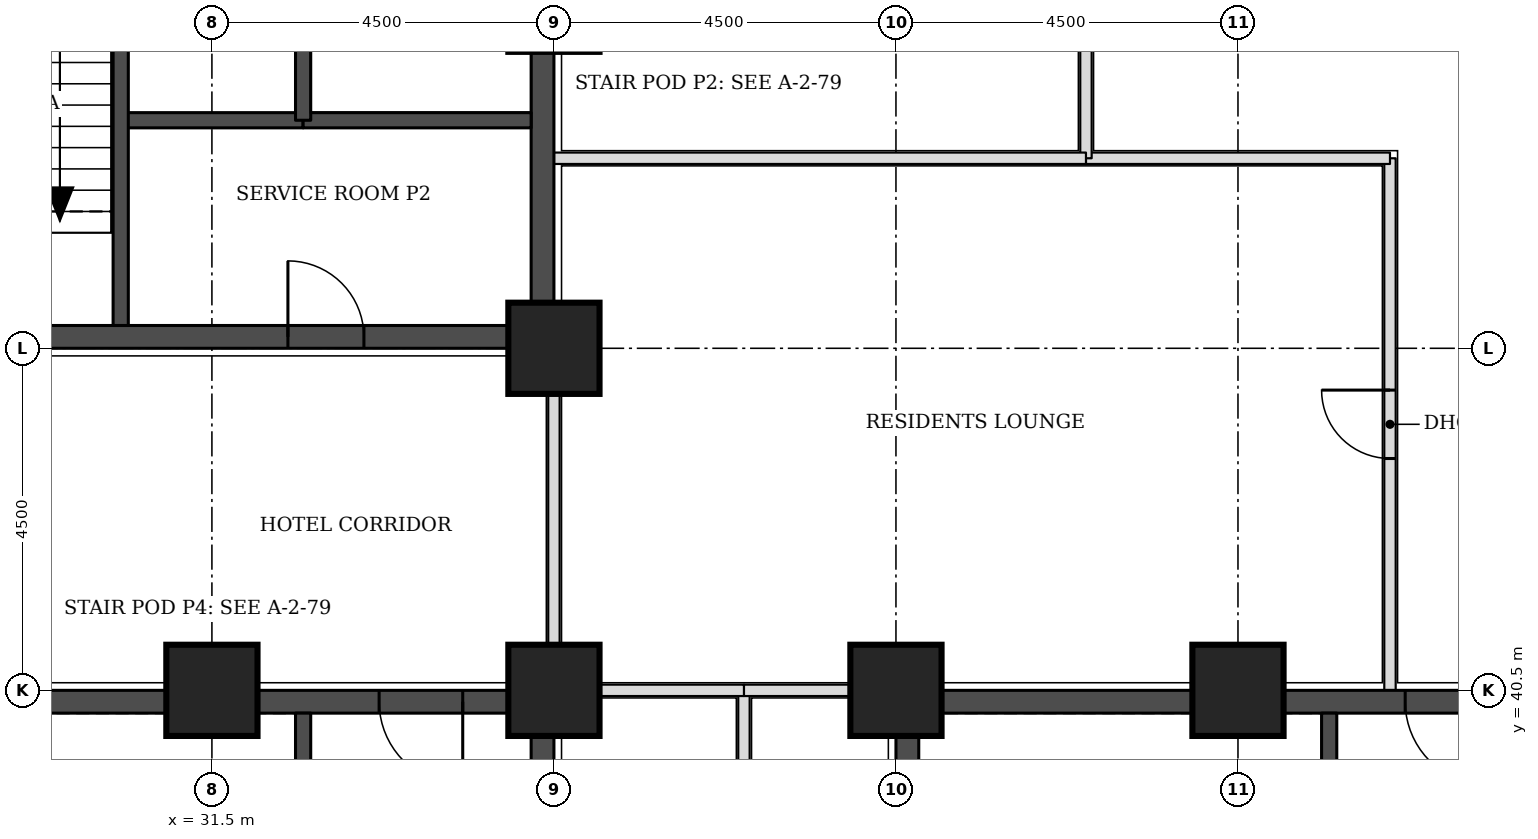
"""IFC4 building model, lengths in metres.
Left out: names, types, materials, properties, quantities, classifications, styles, units other than length and angle.
Written with IfcOpenShell. Run it as: python <this file> out.ifc"""

import sys

from ifc_helpers import new_model, si_unit, direction, frame, frame_2d, origin, origin_2d, place, context, subcontext, project, spatial, rectangle, extrude, element, fill, save


model = new_model("IFC4")
c1 = context("Model", 3, precision=1e-05, world=origin(), true_north=direction((0.0, 1.0)))
c2 = subcontext(c1, "Body", "Model", "MODEL_VIEW")
j1 = project(units=[si_unit("LENGTHUNIT", "METRE"), si_unit("PLANEANGLEUNIT", "RADIAN")], contexts=[c1])
p1 = place(None, origin())
s1 = spatial("IfcSite", under=j1, at=p1, CompositionType="ELEMENT")
p2 = place(p1, origin())
s2 = spatial("IfcBuilding", under=s1, at=p2, CompositionType="ELEMENT")
p3 = place(p2, frame((0.0, 0.0, 46.2)))
s3 = spatial("IfcBuildingStorey", under=s2, at=p3, CompositionType="ELEMENT", Elevation=46.2)
for number, where, z_axis, x_axis in (
    (1, (31.5, 40.5, 0.0), (0.0, 0.0, 1.0), (1.0, 0.0, 0.0)),
    (2, (36.0, 40.5, 0.0), (0.0, 0.0, 1.0), (1.0, 0.0, 0.0)),
    (3, (40.5, 40.5, 0.0), (0.0, 0.0, 1.0), (1.0, 0.0, 0.0)),
    (4, (45.0, 40.5, 0.0), (0.0, 0.0, 1.0), (1.0, 0.0, 0.0)),
    (5, (36.0, 45.0, 0.0), (0.0, 0.0, 1.0), (1.0, 0.0, 0.0)),
):
    element("IfcColumn", number, at=place(p3, frame(where, z_axis=z_axis, x_axis=x_axis)), inside=s3, PredefinedType="COLUMN", context=c2, shape_type="SweptSolid", body=[
        extrude(rectangle(XDim=1.2, YDim=1.2, at=origin_2d()), origin(), (0.0, 0.0, 1.0), 3.3),
    ])
p4 = place(p3, frame((27.3, 45.15, 0.0), z_axis=(0.0, 0.0, 1.0), x_axis=(1.0, 0.0, 0.0)))
e6 = element("IfcWall", 6, at=p4, inside=s3, PredefinedType="SHEAR", context=c2, shape_type="SweptSolid", body=[
    extrude(rectangle(XDim=8.4, YDim=0.3, at=frame_2d((4.2, 0.0))), origin(), (0.0, 0.0, 1.0), 3.3),
])
p5 = place(p4, frame((5.2, 0.0, 0.0)))
e7 = element("IfcOpeningElement", 7, at=p5, cuts=e6, PredefinedType="OPENING", context=c2, shape_type="SweptSolid", body=[
    extrude(rectangle(XDim=1.0, YDim=2.1, at=frame_2d((0.5, 1.05))), frame((0.0, 0.16, 0.0), z_axis=(0.0, -1.0, 0.0), x_axis=(1.0, 0.0, 0.0)), (0.0, 0.0, 1.0), 0.32),
])
p6 = place(p3, frame((35.85, 45.0, 0.0), z_axis=(0.0, 0.0, 1.0), x_axis=(0.0, 1.0, 0.0)))
e8 = element("IfcWall", 8, at=p6, inside=s3, PredefinedType="SHEAR", context=c2, shape_type="SweptSolid", body=[
    extrude(rectangle(XDim=9.0, YDim=0.3, at=frame_2d((4.5, 0.0))), origin(), (0.0, 0.0, 1.0), 3.3),
])
p7 = place(p3, frame((40.8, 40.35, 0.0), z_axis=(0.0, 0.0, 1.0), x_axis=(1.0, 0.0, 0.0)))
e9 = element("IfcWall", 9, at=p7, inside=s3, PredefinedType="SHEAR", context=c2, shape_type="SweptSolid", body=[
    extrude(rectangle(XDim=8.4, YDim=0.3, at=frame_2d((4.2, 0.0))), origin(), (0.0, 0.0, 1.0), 3.3),
])
p8 = place(p7, frame((6.4, 0.0, 0.0)))
e10 = element("IfcOpeningElement", 10, at=p8, cuts=e9, PredefinedType="OPENING", context=c2, shape_type="SweptSolid", body=[
    extrude(rectangle(XDim=1.1, YDim=2.1, at=frame_2d((0.55, 1.05))), frame((0.0, 0.16, 0.0), z_axis=(0.0, -1.0, 0.0), x_axis=(1.0, 0.0, 0.0)), (0.0, 0.0, 1.0), 0.32),
])
p9 = place(p3, frame((40.65, 31.5, 0.0), z_axis=(0.0, 0.0, 1.0), x_axis=(0.0, 1.0, 0.0)))
e11 = element("IfcWall", 11, at=p9, inside=s3, PredefinedType="SHEAR", context=c2, shape_type="SweptSolid", body=[
    extrude(rectangle(XDim=9.0, YDim=0.3, at=frame_2d((4.5, 0.0))), origin(), (0.0, 0.0, 1.0), 3.3),
])
p10 = place(p9, frame((0.4, 0.0, 0.0)))
e12 = element("IfcOpeningElement", 12, at=p10, cuts=e11, PredefinedType="OPENING", context=c2, shape_type="SweptSolid", body=[
    extrude(rectangle(XDim=1.1, YDim=2.1, at=frame_2d((0.55, 1.05))), frame((0.0, 0.16, 0.0), z_axis=(0.0, -1.0, 0.0), x_axis=(1.0, 0.0, 0.0)), (0.0, 0.0, 1.0), 0.32),
])
p11 = place(p3, frame((27.3, 40.35, 0.0), z_axis=(0.0, 0.0, 1.0), x_axis=(1.0, 0.0, 0.0)))
e13 = element("IfcWall", 13, at=p11, inside=s3, PredefinedType="SHEAR", context=c2, shape_type="SweptSolid", body=[
    extrude(rectangle(XDim=8.4, YDim=0.3, at=frame_2d((4.2, 0.0))), origin(), (0.0, 0.0, 1.0), 3.3),
])
p12 = place(p11, frame((6.4, 0.0, 0.0)))
e14 = element("IfcOpeningElement", 14, at=p12, cuts=e13, PredefinedType="OPENING", context=c2, shape_type="SweptSolid", body=[
    extrude(rectangle(XDim=1.1, YDim=2.1, at=frame_2d((0.55, 1.05))), frame((0.0, 0.16, 0.0), z_axis=(0.0, -1.0, 0.0), x_axis=(1.0, 0.0, 0.0)), (0.0, 0.0, 1.0), 0.32),
])
p13 = place(p3, frame((35.85, 31.5, 0.0), z_axis=(0.0, 0.0, 1.0), x_axis=(0.0, 1.0, 0.0)))
e15 = element("IfcWall", 15, at=p13, inside=s3, PredefinedType="SHEAR", context=c2, shape_type="SweptSolid", body=[
    extrude(rectangle(XDim=9.0, YDim=0.3, at=frame_2d((4.5, 0.0))), origin(), (0.0, 0.0, 1.0), 3.3),
])
p14 = place(p3, frame((38.5, 27.15, 0.0), z_axis=(0.0, 0.0, 1.0), x_axis=(0.0, 1.0, 0.0)))
e16 = element("IfcWall", 16, at=p14, inside=s3, PredefinedType="PARTITIONING", context=c2, shape_type="SweptSolid", body=[
    extrude(rectangle(XDim=13.35, YDim=0.15, at=frame_2d((6.675, 0.0))), origin(), (0.0, 0.0, 1.0), 3.08),
])
p15 = place(p14, frame((6.225, 0.0, 0.0)))
e17 = element("IfcOpeningElement", 17, at=p15, cuts=e16, PredefinedType="OPENING", context=c2, shape_type="SweptSolid", body=[
    extrude(rectangle(XDim=0.9, YDim=2.1, at=frame_2d((0.45, 1.05))), frame((0.0, 0.085, 0.0), z_axis=(0.0, -1.0, 0.0), x_axis=(1.0, 0.0, 0.0)), (0.0, 0.0, 1.0), 0.17),
])
p16 = place(p3, frame((38.5, 40.5, 0.0), z_axis=(0.0, 0.0, 1.0), x_axis=(1.0, 0.0, 0.0)))
e18 = element("IfcWall", 18, at=p16, inside=s3, PredefinedType="PARTITIONING", context=c2, shape_type="SweptSolid", body=[
    extrude(rectangle(XDim=1.95, YDim=0.15, at=frame_2d((0.975, 0.0))), origin(), (0.0, 0.0, 1.0), 2.33),
])
p17 = place(p3, frame((36.0, 40.55, 0.0), z_axis=(0.0, 0.0, 1.0), x_axis=(0.0, 1.0, 0.0)))
e19 = element("IfcWall", 19, at=p17, inside=s3, PredefinedType="PARTITIONING", context=c2, shape_type="SweptSolid", body=[
    extrude(rectangle(XDim=4.4, YDim=0.15, at=frame_2d((2.2, 0.0))), origin(), (0.0, 0.0, 1.0), 2.33),
])
p18 = place(p3, frame((47.0, 40.5, 0.0), z_axis=(0.0, 0.0, 1.0), x_axis=(0.0, 1.0, 0.0)))
e20 = element("IfcWall", 20, at=p18, inside=s3, PredefinedType="PARTITIONING", context=c2, shape_type="SweptSolid", body=[
    extrude(rectangle(XDim=7.0, YDim=0.15, at=frame_2d((3.5, 0.0))), origin(), (0.0, 0.0, 1.0), 3.08),
])
p19 = place(p18, frame((3.05, 0.0, 0.0)))
e21 = element("IfcOpeningElement", 21, at=p19, cuts=e20, PredefinedType="OPENING", context=c2, shape_type="SweptSolid", body=[
    extrude(rectangle(XDim=0.9, YDim=2.1, at=frame_2d((0.45, 1.05))), frame((0.0, 0.085, 0.0), z_axis=(0.0, -1.0, 0.0), x_axis=(1.0, 0.0, 0.0)), (0.0, 0.0, 1.0), 0.17),
])
p20 = place(p3, frame((43.0, 47.5, 0.0), z_axis=(0.0, 0.0, 1.0), x_axis=(1.0, 0.0, 0.0)))
e22 = element("IfcWall", 22, at=p20, inside=s3, PredefinedType="PARTITIONING", context=c2, shape_type="SweptSolid", body=[
    extrude(rectangle(XDim=4.0, YDim=0.15, at=frame_2d((2.0, 0.0))), origin(), (0.0, 0.0, 1.0), 3.08),
])
p21 = place(p3, frame((43.0, 47.5, 0.0), z_axis=(0.0, 0.0, 1.0), x_axis=(0.0, 1.0, 0.0)))
e23 = element("IfcWall", 23, at=p21, inside=s3, PredefinedType="PARTITIONING", context=c2, shape_type="SweptSolid", body=[
    extrude(rectangle(XDim=6.5, YDim=0.15, at=frame_2d((3.25, 0.0))), origin(), (0.0, 0.0, 1.0), 3.08),
])
p22 = place(p3, frame((36.05, 40.5, 0.0), z_axis=(0.0, 0.0, 1.0), x_axis=(1.0, 0.0, 0.0)))
e24 = element("IfcWall", 24, at=p22, inside=s3, PredefinedType="PARTITIONING", context=c2, shape_type="SweptSolid", body=[
    extrude(rectangle(XDim=2.45, YDim=0.15, at=frame_2d((1.225, 0.0))), origin(), (0.0, 0.0, 1.0), 2.33),
])
p23 = place(p3, frame((36.0, 47.5, 0.0), z_axis=(0.0, 0.0, 1.0), x_axis=(1.0, 0.0, 0.0)))
e25 = element("IfcWall", 25, at=p23, inside=s3, PredefinedType="PARTITIONING", context=c2, shape_type="SweptSolid", body=[
    extrude(rectangle(XDim=7.0, YDim=0.15, at=frame_2d((3.5, 0.0))), origin(), (0.0, 0.0, 1.0), 3.08),
])
p24 = place(p3, frame((30.3, 48.0, 0.0), z_axis=(0.0, 0.0, 1.0), x_axis=(1.0, 0.0, 0.0)))
e26 = element("IfcWall", 26, at=p24, inside=s3, PredefinedType="SOLIDWALL", context=c2, shape_type="SweptSolid", body=[
    extrude(rectangle(XDim=2.4, YDim=0.2, at=frame_2d((1.2, 0.0))), origin(), (0.0, 0.0, 1.0), 3.08),
])
p25 = place(p3, frame((32.7, 48.0, 0.0), z_axis=(0.0, 0.0, 1.0), x_axis=(1.0, 0.0, 0.0)))
e27 = element("IfcWall", 27, at=p25, inside=s3, PredefinedType="SOLIDWALL", context=c2, shape_type="SweptSolid", body=[
    extrude(rectangle(XDim=3.0, YDim=0.2, at=frame_2d((1.5, 0.0))), origin(), (0.0, 0.0, 1.0), 3.08),
])
for number, where, z_axis, x_axis in (
    (28, (30.3, 45.3, 0.0), (0.0, 0.0, 1.0), (0.0, 1.0, 0.0)),
    (29, (32.7, 48.0, 0.0), (0.0, 0.0, 1.0), (0.0, 1.0, 0.0)),
    (30, (46.2, 34.5, 0.0), (0.0, 0.0, 1.0), (0.0, 1.0, 0.0)),
    (31, (32.7, 34.5, 0.0), (0.0, 0.0, 1.0), (0.0, 1.0, 0.0)),
):
    element("IfcWall", number, at=place(p3, frame(where, z_axis=z_axis, x_axis=x_axis)), inside=s3, PredefinedType="SOLIDWALL", context=c2, shape_type="SweptSolid", body=[
        extrude(rectangle(XDim=5.7, YDim=0.2, at=frame_2d((2.85, 0.0))), origin(), (0.0, 0.0, 1.0), 3.08),
    ])
p26 = place(p19, origin())
e32 = element("IfcDoor", 32, at=p26, inside=s3, OperationType="SINGLE_SWING_RIGHT", PredefinedType="DOOR", context=c2, shape_type="SweptSolid", body=[
    extrude(rectangle(XDim=0.9, YDim=2.1, at=frame_2d((0.45, 1.05))), frame((0.0, 0.025, 0.0), z_axis=(0.0, -1.0, 0.0), x_axis=(1.0, 0.0, 0.0)), (0.0, 0.0, 1.0), 0.05),
])
fill(e21, e32)
p27 = place(p5, origin())
e33 = element("IfcDoor", 33, at=p27, inside=s3, OperationType="SINGLE_SWING_LEFT", PredefinedType="DOOR", context=c2, shape_type="SweptSolid", body=[
    extrude(rectangle(XDim=1.0, YDim=2.1, at=frame_2d((0.5, 1.05))), frame((0.0, 0.025, 0.0), z_axis=(0.0, -1.0, 0.0), x_axis=(1.0, 0.0, 0.0)), (0.0, 0.0, 1.0), 0.05),
])
fill(e7, e33)
p28 = place(p8, frame((1.1, 0.0, 0.0), z_axis=(0.0, 0.0, 1.0), x_axis=(-1.0, 0.0, 0.0)))
e34 = element("IfcDoor", 34, at=p28, inside=s3, OperationType="SINGLE_SWING_LEFT", PredefinedType="DOOR", context=c2, shape_type="SweptSolid", body=[
    extrude(rectangle(XDim=1.1, YDim=2.1, at=frame_2d((0.55, 1.05))), frame((0.0, 0.025, 0.0), z_axis=(0.0, -1.0, 0.0), x_axis=(1.0, 0.0, 0.0)), (0.0, 0.0, 1.0), 0.05),
])
fill(e10, e34)
p29 = place(p12, frame((1.1, 0.0, 0.0), z_axis=(0.0, 0.0, 1.0), x_axis=(-1.0, 0.0, 0.0)))
e35 = element("IfcDoor", 35, at=p29, inside=s3, OperationType="SINGLE_SWING_LEFT", PredefinedType="DOOR", context=c2, shape_type="SweptSolid", body=[
    extrude(rectangle(XDim=1.1, YDim=2.1, at=frame_2d((0.55, 1.05))), frame((0.0, 0.025, 0.0), z_axis=(0.0, -1.0, 0.0), x_axis=(1.0, 0.0, 0.0)), (0.0, 0.0, 1.0), 0.05),
])
fill(e14, e35)
save(model, sys.argv[1])
